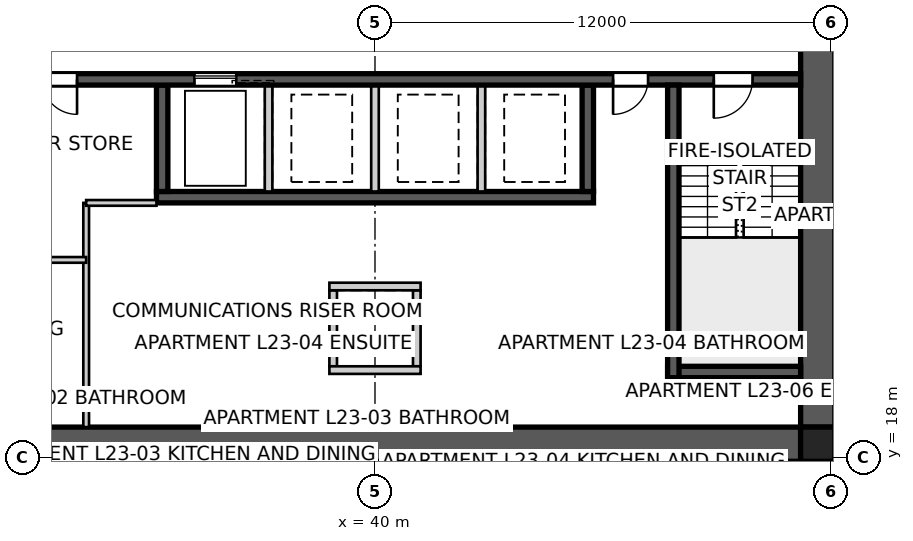
"""IFC4 building model, lengths in metres.
Left out: names, types, materials, properties, quantities, classifications, styles, units other than length and angle.
Written with IfcOpenShell. Run it as: python <this file> out.ifc"""

import sys

from ifc_helpers import new_model, si_unit, direction, frame, frame_2d, origin, origin_2d, place, context, subcontext, project, spatial, polyline, rectangle, outline, extrude, element, fill, save


model = new_model("IFC4")
c1 = context("Model", 3, precision=1e-05, world=origin(), true_north=direction((0.0, 1.0)))
c2 = subcontext(c1, "Body", "Model", "MODEL_VIEW")
j1 = project(units=[si_unit("LENGTHUNIT", "METRE"), si_unit("PLANEANGLEUNIT", "RADIAN")], contexts=[c1])
p1 = place(None, origin())
s1 = spatial("IfcSite", under=j1, at=p1, CompositionType="ELEMENT")
p2 = place(p1, origin())
s2 = spatial("IfcBuilding", under=s1, at=p2, CompositionType="ELEMENT")
p3 = place(p2, frame((0.0, 0.0, 86.2)))
s3 = spatial("IfcBuildingStorey", under=s2, at=p3, CompositionType="ELEMENT", Elevation=86.2)
p4 = place(p3, frame((51.2, 18.35, 0.0), z_axis=(0.0, 0.0, 1.0), x_axis=(-1.0, 0.0, 0.0)))
e1 = element("IfcWall", 1, at=p4, inside=s3, PredefinedType="SHEAR", context=c2, shape_type="SweptSolid", body=[
    extrude(outline(polyline([(0.0, -0.45), (22.4, -0.45), (22.4, -0.025), (22.85, -0.025), (22.85, 0.025), (22.4, 0.025), (22.4, 0.45), (0.0, 0.45), (0.0, 0.025), (-0.45, 0.025), (-0.45, -0.025), (0.0, -0.025), (0.0, -0.45)])), origin(), (0.0, 0.0, 1.0), 3.4),
])
p5 = place(p3, frame((51.65, 18.8, 0.0), z_axis=(0.0, 0.0, 1.0), x_axis=(0.0, 1.0, 0.0)))
e2 = element("IfcWall", 2, at=p5, inside=s3, PredefinedType="SHEAR", context=c2, shape_type="SweptSolid", body=[
    extrude(outline(polyline([(0.0, -0.45), (22.4, -0.45), (22.4, -0.025), (22.85, -0.025), (22.85, 0.025), (22.4, 0.025), (22.4, 0.45), (0.0, 0.45), (0.0, 0.025), (-0.45, 0.025), (-0.45, -0.025), (0.0, -0.025), (0.0, -0.45)])), origin(), (0.0, 0.0, 1.0), 3.4),
])
p6 = place(p5, frame((11.14, 0.0, 0.0)))
e3 = element("IfcOpeningElement", 3, at=p6, cuts=e2, PredefinedType="OPENING", context=c2, shape_type="SweptSolid", body=[
    extrude(rectangle(XDim=1.02, YDim=2.4, at=frame_2d((0.51, 1.2))), frame((0.0, 0.46, 0.0), z_axis=(0.0, -1.0, 0.0), x_axis=(1.0, 0.0, 0.0)), (0.0, 0.0, 1.0), 0.92),
])
p7 = place(p3, frame((51.2, 27.95, 0.0), z_axis=(0.0, 0.0, 1.0), x_axis=(-1.0, 0.0, 0.0)))
e4 = element("IfcWall", 4, at=p7, inside=s3, PredefinedType="SHEAR", context=c2, shape_type="SweptSolid", body=[
    extrude(rectangle(XDim=22.4, YDim=0.3, at=frame_2d((11.2, 0.0))), origin(), (0.0, 0.0, 1.0), 3.4),
])
p8 = place(p7, frame((19.04, 0.0, 0.0)))
e5 = element("IfcOpeningElement", 5, at=p8, cuts=e4, PredefinedType="OPENING", context=c2, shape_type="SweptSolid", body=[
    extrude(rectangle(XDim=0.92, YDim=2.1, at=frame_2d((0.46, 1.05))), frame((0.0, 0.16, 0.0), z_axis=(0.0, -1.0, 0.0), x_axis=(1.0, 0.0, 0.0)), (0.0, 0.0, 1.0), 0.32),
])
p9 = place(p7, frame((1.265, 0.0, 0.0)))
e6 = element("IfcOpeningElement", 6, at=p9, cuts=e4, PredefinedType="OPENING", context=c2, shape_type="SweptSolid", body=[
    extrude(rectangle(XDim=1.02, YDim=2.1, at=frame_2d((0.51, 1.05))), frame((0.0, 0.16, 0.0), z_axis=(0.0, -1.0, 0.0), x_axis=(1.0, 0.0, 0.0)), (0.0, 0.0, 1.0), 0.32),
])
p10 = place(p7, frame((4.015, 0.0, 0.0)))
e7 = element("IfcOpeningElement", 7, at=p10, cuts=e4, PredefinedType="OPENING", context=c2, shape_type="SweptSolid", body=[
    extrude(rectangle(XDim=0.92, YDim=2.1, at=frame_2d((0.46, 1.05))), frame((0.0, 0.16, 0.0), z_axis=(0.0, -1.0, 0.0), x_axis=(1.0, 0.0, 0.0)), (0.0, 0.0, 1.0), 0.32),
])
p11 = place(p7, frame((14.85, 0.0, 0.0)))
e8 = element("IfcOpeningElement", 8, at=p11, cuts=e4, PredefinedType="OPENING", context=c2, shape_type="SweptSolid", body=[
    extrude(rectangle(XDim=1.1, YDim=2.1, at=frame_2d((0.55, 1.05))), frame((0.0, 0.16, 0.0), z_axis=(0.0, -1.0, 0.0), x_axis=(1.0, 0.0, 0.0)), (0.0, 0.0, 1.0), 0.32),
])
p12 = place(p3, frame((45.75, 24.85, 0.0), z_axis=(0.0, 0.0, 1.0), x_axis=(-1.0, 0.0, 0.0)))
e9 = element("IfcWall", 9, at=p12, inside=s3, PredefinedType="SHEAR", context=c2, shape_type="SweptSolid", body=[
    extrude(rectangle(XDim=11.5, YDim=0.3, at=frame_2d((5.75, 0.0))), origin(), (0.0, 0.0, 1.0), 3.4),
])
p13 = place(p3, frame((45.6, 27.8, 0.0), z_axis=(0.0, 0.0, 1.0), x_axis=(0.0, -1.0, 0.0)))
e10 = element("IfcWall", 10, at=p13, inside=s3, PredefinedType="SHEAR", context=c2, shape_type="SweptSolid", body=[
    extrude(rectangle(XDim=2.8, YDim=0.3, at=frame_2d((1.4, 0.0))), origin(), (0.0, 0.0, 1.0), 3.4),
])
for number, where, z_axis, x_axis in (
    (11, (42.8, 27.8, 0.0), (0.0, 0.0, 1.0), (0.0, -1.0, 0.0)),
    (12, (40.0, 27.8, 0.0), (0.0, 0.0, 1.0), (0.0, -1.0, 0.0)),
    (13, (37.2, 27.8, 0.0), (0.0, 0.0, 1.0), (0.0, -1.0, 0.0)),
):
    element("IfcWall", number, at=place(p3, frame(where, z_axis=z_axis, x_axis=x_axis)), inside=s3, PredefinedType="SOLIDWALL", context=c2, shape_type="SweptSolid", body=[
        extrude(rectangle(XDim=2.8, YDim=0.2, at=frame_2d((1.4, 0.0))), origin(), (0.0, 0.0, 1.0), 3.4),
    ])
p14 = place(p3, frame((34.4, 27.8, 0.0), z_axis=(0.0, 0.0, 1.0), x_axis=(0.0, -1.0, 0.0)))
e14 = element("IfcWall", 14, at=p14, inside=s3, PredefinedType="SHEAR", context=c2, shape_type="SweptSolid", body=[
    extrude(rectangle(XDim=2.8, YDim=0.3, at=frame_2d((1.4, 0.0))), origin(), (0.0, 0.0, 1.0), 3.4),
])
p15 = place(p3, frame((47.85, 27.8, 0.0), z_axis=(0.0, 0.0, 1.0), x_axis=(0.0, -1.0, 0.0)))
e15 = element("IfcWall", 15, at=p15, inside=s3, PredefinedType="SHEAR", context=c2, shape_type="SweptSolid", body=[
    extrude(rectangle(XDim=7.7, YDim=0.3, at=frame_2d((3.85, 0.0))), origin(), (0.0, 0.0, 1.0), 3.4),
])
p16 = place(p3, frame((51.2, 20.25, 0.0), z_axis=(0.0, 0.0, 1.0), x_axis=(-1.0, 0.0, 0.0)))
e16 = element("IfcWall", 16, at=p16, inside=s3, PredefinedType="SHEAR", context=c2, shape_type="SweptSolid", body=[
    extrude(rectangle(XDim=3.5, YDim=0.3, at=frame_2d((1.75, 0.0))), origin(), (0.0, 0.0, 1.0), 3.4),
])
for number, where, z_axis, x_axis in (
    (17, (38.9, 22.4, 0.0), (0.0, 0.0, 1.0), (0.0, -1.0, 0.0)),
    (18, (41.1, 22.4, 0.0), (0.0, 0.0, 1.0), (0.0, -1.0, 0.0)),
):
    element("IfcWall", number, at=place(p3, frame(where, z_axis=z_axis, x_axis=x_axis)), inside=s3, PredefinedType="SOLIDWALL", context=c2, shape_type="SweptSolid", body=[
        extrude(rectangle(XDim=2.0, YDim=0.2, at=frame_2d((1.0, 0.0))), origin(), (0.0, 0.0, 1.0), 3.4),
    ])
for number, where, z_axis, x_axis in (
    (19, (38.8, 22.5, 0.0), (0.0, 0.0, 1.0), (1.0, 0.0, 0.0)),
    (20, (38.8, 20.3, 0.0), (0.0, 0.0, 1.0), (1.0, 0.0, 0.0)),
):
    element("IfcWall", number, at=place(p3, frame(where, z_axis=z_axis, x_axis=x_axis)), inside=s3, PredefinedType="SOLIDWALL", context=c2, shape_type="SweptSolid", body=[
        extrude(rectangle(XDim=2.4, YDim=0.2, at=frame_2d((1.2, 0.0))), origin(), (0.0, 0.0, 1.0), 3.4),
    ])
p17 = place(p3, frame((51.65, 18.35, 0.0), z_axis=(0.0, 0.0, 1.0), x_axis=(1.0, 0.0, 0.0)))
e21 = element("IfcColumn", 21, at=p17, inside=s3, PredefinedType="COLUMN", context=c2, shape_type="SweptSolid", body=[
    extrude(rectangle(XDim=0.9, YDim=0.9, at=origin_2d()), origin(), (0.0, 0.0, 1.0), 3.4),
])
p18 = place(p3, frame((32.4, 18.8, 0.0), z_axis=(0.0, 0.0, 1.0), x_axis=(0.0, 1.0, 0.0)))
e22 = element("IfcWall", 22, at=p18, inside=s3, PredefinedType="SOLIDWALL", context=c2, shape_type="SweptSolid", body=[
    extrude(rectangle(XDim=5.9, YDim=0.15, at=frame_2d((2.95, 0.0))), origin(), (0.0, 0.0, 1.0), 3.25),
])
p19 = place(p3, frame((32.4, 24.7, 0.0), z_axis=(0.0, 0.0, 1.0), x_axis=(1.0, 0.0, 0.0)))
e23 = element("IfcWall", 23, at=p19, inside=s3, PredefinedType="SOLIDWALL", context=c2, shape_type="SweptSolid", body=[
    extrude(rectangle(XDim=1.85, YDim=0.15, at=frame_2d((0.925, 0.0))), origin(), (0.0, 0.0, 1.0), 3.25),
])
p20 = place(p3, frame((32.4, 23.2, 0.0), z_axis=(0.0, 0.0, 1.0), x_axis=(-1.0, 0.0, 0.0)))
e24 = element("IfcWall", 24, at=p20, inside=s3, PredefinedType="SOLIDWALL", context=c2, shape_type="SweptSolid", body=[
    extrude(rectangle(XDim=3.6, YDim=0.15, at=frame_2d((1.8, 0.0))), origin(), (0.0, 0.0, 1.0), 3.25),
])
p21 = place(p20, frame((1.34, 0.0, 0.0)))
e25 = element("IfcOpeningElement", 25, at=p21, cuts=e24, PredefinedType="OPENING", context=c2, shape_type="SweptSolid", body=[
    extrude(rectangle(XDim=0.92, YDim=2.1, at=frame_2d((0.46, 1.05))), frame((0.0, 0.085, 0.0), z_axis=(0.0, -1.0, 0.0), x_axis=(1.0, 0.0, 0.0)), (0.0, 0.0, 1.0), 0.17),
])
p22 = place(p8, origin())
e26 = element("IfcDoor", 26, at=p22, inside=s3, OperationType="SINGLE_SWING_LEFT", PredefinedType="DOOR", context=c2, shape_type="SweptSolid", body=[
    extrude(rectangle(XDim=0.92, YDim=2.1, at=frame_2d((0.46, 1.05))), frame((0.0, 0.025, 0.0), z_axis=(0.0, -1.0, 0.0), x_axis=(1.0, 0.0, 0.0)), (0.0, 0.0, 1.0), 0.05),
])
fill(e5, e26)
p23 = place(p9, origin())
e27 = element("IfcDoor", 27, at=p23, inside=s3, OperationType="SINGLE_SWING_RIGHT", PredefinedType="DOOR", context=c2, shape_type="SweptSolid", body=[
    extrude(rectangle(XDim=1.02, YDim=2.1, at=frame_2d((0.51, 1.05))), frame((0.0, 0.025, 0.0), z_axis=(0.0, -1.0, 0.0), x_axis=(1.0, 0.0, 0.0)), (0.0, 0.0, 1.0), 0.05),
])
fill(e6, e27)
p24 = place(p10, origin())
e28 = element("IfcDoor", 28, at=p24, inside=s3, OperationType="SINGLE_SWING_RIGHT", PredefinedType="DOOR", context=c2, shape_type="SweptSolid", body=[
    extrude(rectangle(XDim=0.92, YDim=2.1, at=frame_2d((0.46, 1.05))), frame((0.0, 0.025, 0.0), z_axis=(0.0, -1.0, 0.0), x_axis=(1.0, 0.0, 0.0)), (0.0, 0.0, 1.0), 0.05),
])
fill(e7, e28)
p25 = place(p11, origin())
e29 = element("IfcDoor", 29, at=p25, inside=s3, OperationType="SLIDING_TO_LEFT", PredefinedType="DOOR", context=c2, shape_type="SweptSolid", body=[
    extrude(rectangle(XDim=1.1, YDim=2.1, at=frame_2d((0.55, 1.05))), frame((0.0, 0.025, 0.0), z_axis=(0.0, -1.0, 0.0), x_axis=(1.0, 0.0, 0.0)), (0.0, 0.0, 1.0), 0.05),
])
fill(e8, e29)
save(model, sys.argv[1])
